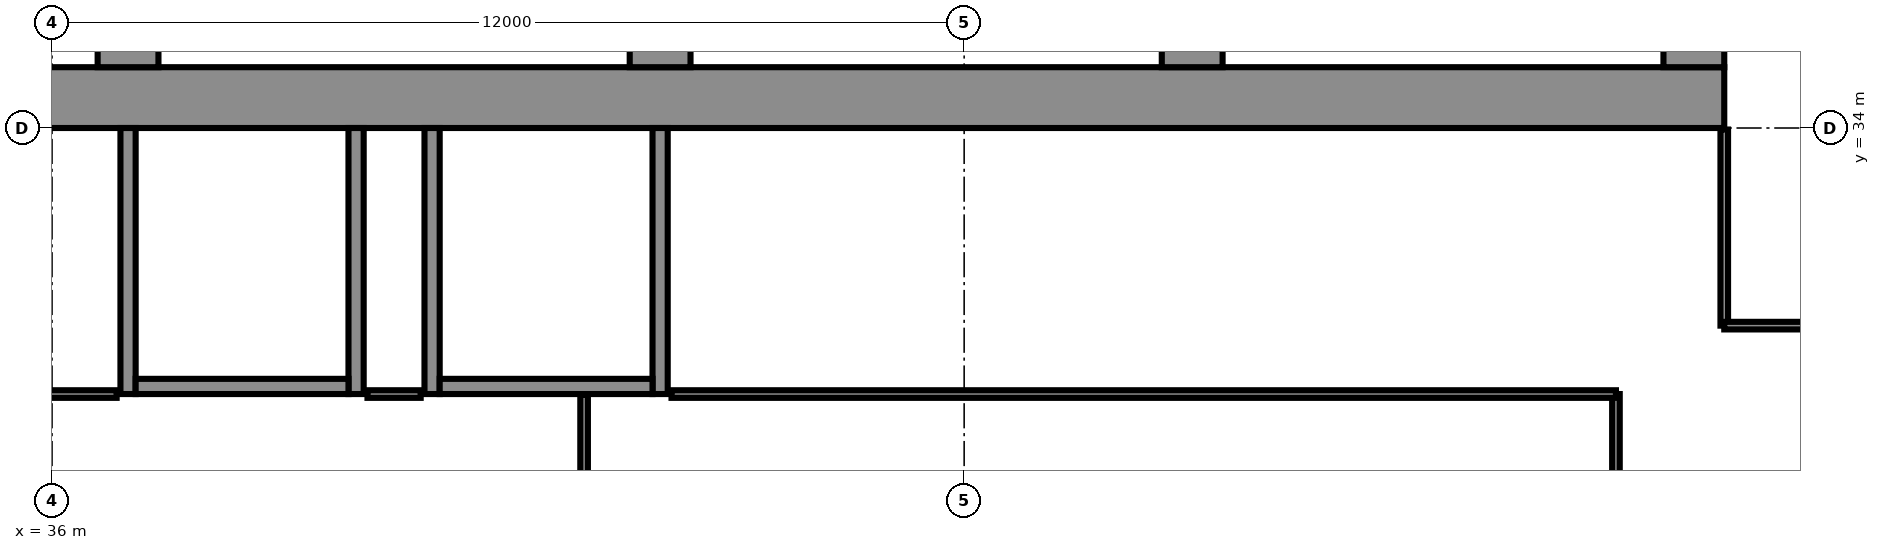
"""IFC4 building model, lengths in metres.
Left out: names, types, materials, properties, quantities, classifications, styles, units other than length and angle.
Written with IfcOpenShell. Run it as: python <this file> out.ifc"""

import sys

from ifc_helpers import new_model, si_unit, direction, frame, frame_2d, origin, place, context, subcontext, project, spatial, polyline, rectangle, outline, extrude, element, fill, save


model = new_model("IFC4")
c1 = context("Model", 3, precision=1e-05, world=origin(), true_north=direction((0.0, 1.0)))
c2 = subcontext(c1, "Body", "Model", "MODEL_VIEW")
j1 = project(units=[si_unit("LENGTHUNIT", "METRE"), si_unit("PLANEANGLEUNIT", "RADIAN")], contexts=[c1])
p1 = place(None, origin())
s1 = spatial("IfcSite", under=j1, at=p1, CompositionType="ELEMENT")
p2 = place(p1, origin())
s2 = spatial("IfcBuilding", under=s1, at=p2, CompositionType="ELEMENT")
p3 = place(p2, frame((0.0, 0.0, 151.9)))
s3 = spatial("IfcBuildingStorey", under=s2, at=p3, CompositionType="ELEMENT", Elevation=151.9)
p4 = place(p3, frame((16.0, 34.4, 0.0), z_axis=(0.0, 0.0, 1.0), x_axis=(1.0, 0.0, 0.0)))
e1 = element("IfcWall", 1, at=p4, inside=s3, PredefinedType="SHEAR", context=c2, shape_type="SweptSolid", body=[
    extrude(rectangle(XDim=42.0, YDim=0.8, at=frame_2d((21.0, 0.0))), origin(), (0.0, 0.0, 1.0), 3.6),
])
p5 = place(p4, frame((3.2, 0.0, 0.0)))
e2 = element("IfcOpeningElement", 2, at=p5, cuts=e1, PredefinedType="OPENING", context=c2, shape_type="SweptSolid", body=[
    extrude(rectangle(XDim=1.0, YDim=2.1, at=frame_2d((0.5, 1.05))), frame((0.0, 0.41, 0.0), z_axis=(0.0, -1.0, 0.0), x_axis=(1.0, 0.0, 0.0)), (0.0, 0.0, 1.0), 0.82),
])
p6 = place(p4, frame((7.65, 0.0, 0.0)))
e3 = element("IfcOpeningElement", 3, at=p6, cuts=e1, PredefinedType="OPENING", context=c2, shape_type="SweptSolid", body=[
    extrude(rectangle(XDim=1.2, YDim=2.1, at=frame_2d((0.6, 1.05))), frame((0.0, 0.41, 0.0), z_axis=(0.0, -1.0, 0.0), x_axis=(1.0, 0.0, 0.0)), (0.0, 0.0, 1.0), 0.82),
])
p7 = place(p4, frame((14.767, 0.0, 0.0)))
e4 = element("IfcOpeningElement", 4, at=p7, cuts=e1, PredefinedType="OPENING", context=c2, shape_type="SweptSolid", body=[
    extrude(rectangle(XDim=1.1, YDim=2.1, at=frame_2d((0.55, 1.05))), frame((0.0, 0.41, 0.0), z_axis=(0.0, -1.0, 0.0), x_axis=(1.0, 0.0, 0.0)), (0.0, 0.0, 1.0), 0.82),
])
p8 = place(p4, frame((19.133, 0.0, 0.0)))
e5 = element("IfcOpeningElement", 5, at=p8, cuts=e1, PredefinedType="OPENING", context=c2, shape_type="SweptSolid", body=[
    extrude(rectangle(XDim=1.1, YDim=2.1, at=frame_2d((0.55, 1.05))), frame((0.0, 0.41, 0.0), z_axis=(0.0, -1.0, 0.0), x_axis=(1.0, 0.0, 0.0)), (0.0, 0.0, 1.0), 0.82),
])
p9 = place(p4, frame((16.8, 0.0, 0.0)))
e6 = element("IfcOpeningElement", 6, at=p9, cuts=e1, PredefinedType="OPENING", context=c2, shape_type="SweptSolid", body=[
    extrude(rectangle(XDim=1.4, YDim=2.1, at=frame_2d((0.7, 1.05))), frame((0.0, 0.41, 0.0), z_axis=(0.0, -1.0, 0.0), x_axis=(1.0, 0.0, 0.0)), (0.0, 0.0, 1.0), 0.82),
])
p10 = place(p4, frame((21.767, 0.0, 0.0)))
e7 = element("IfcOpeningElement", 7, at=p10, cuts=e1, PredefinedType="OPENING", context=c2, shape_type="SweptSolid", body=[
    extrude(rectangle(XDim=1.1, YDim=2.1, at=frame_2d((0.55, 1.05))), frame((0.0, 0.41, 0.0), z_axis=(0.0, -1.0, 0.0), x_axis=(1.0, 0.0, 0.0)), (0.0, 0.0, 1.0), 0.82),
])
p11 = place(p4, frame((23.95, 0.0, 0.0)))
e8 = element("IfcOpeningElement", 8, at=p11, cuts=e1, PredefinedType="OPENING", context=c2, shape_type="SweptSolid", body=[
    extrude(rectangle(XDim=1.1, YDim=2.1, at=frame_2d((0.55, 1.05))), frame((0.0, 0.41, 0.0), z_axis=(0.0, -1.0, 0.0), x_axis=(1.0, 0.0, 0.0)), (0.0, 0.0, 1.0), 0.82),
])
p12 = place(p4, frame((26.133, 0.0, 0.0)))
e9 = element("IfcOpeningElement", 9, at=p12, cuts=e1, PredefinedType="OPENING", context=c2, shape_type="SweptSolid", body=[
    extrude(rectangle(XDim=1.1, YDim=2.1, at=frame_2d((0.55, 1.05))), frame((0.0, 0.41, 0.0), z_axis=(0.0, -1.0, 0.0), x_axis=(1.0, 0.0, 0.0)), (0.0, 0.0, 1.0), 0.82),
])
p13 = place(p4, frame((33.15, 0.0, 0.0)))
e10 = element("IfcOpeningElement", 10, at=p13, cuts=e1, PredefinedType="OPENING", context=c2, shape_type="SweptSolid", body=[
    extrude(rectangle(XDim=1.2, YDim=2.1, at=frame_2d((0.6, 1.05))), frame((0.0, 0.41, 0.0), z_axis=(0.0, -1.0, 0.0), x_axis=(1.0, 0.0, 0.0)), (0.0, 0.0, 1.0), 0.82),
])
p14 = place(p4, frame((35.817, 0.0, 0.0)))
e11 = element("IfcOpeningElement", 11, at=p14, cuts=e1, PredefinedType="OPENING", context=c2, shape_type="SweptSolid", body=[
    extrude(rectangle(XDim=1.0, YDim=2.1, at=frame_2d((0.5, 1.05))), frame((0.0, 0.41, 0.0), z_axis=(0.0, -1.0, 0.0), x_axis=(1.0, 0.0, 0.0)), (0.0, 0.0, 1.0), 0.82),
])
p15 = place(p4, frame((39.95, 0.0, 0.0)))
e12 = element("IfcOpeningElement", 12, at=p15, cuts=e1, PredefinedType="OPENING", context=c2, shape_type="SweptSolid", body=[
    extrude(rectangle(XDim=1.0, YDim=2.1, at=frame_2d((0.5, 1.05))), frame((0.0, 0.41, 0.0), z_axis=(0.0, -1.0, 0.0), x_axis=(1.0, 0.0, 0.0)), (0.0, 0.0, 1.0), 0.82),
])
p16 = place(p4, frame((37.767, 0.0, 0.0)))
e13 = element("IfcOpeningElement", 13, at=p16, cuts=e1, PredefinedType="OPENING", context=c2, shape_type="SweptSolid", body=[
    extrude(rectangle(XDim=1.4, YDim=2.1, at=frame_2d((0.7, 1.05))), frame((0.0, 0.41, 0.0), z_axis=(0.0, -1.0, 0.0), x_axis=(1.0, 0.0, 0.0)), (0.0, 0.0, 1.0), 0.82),
])
p17 = place(p3, frame((37.0, 34.8, 0.0), z_axis=(0.0, 0.0, 1.0), x_axis=(0.0, 1.0, 0.0)))
e14 = element("IfcWall", 14, at=p17, inside=s3, PredefinedType="SHEAR", context=c2, shape_type="SweptSolid", body=[
    extrude(rectangle(XDim=14.987, YDim=0.8, at=frame_2d((7.493, 0.0))), origin(), (0.0, 0.0, 1.0), 3.6),
])
p18 = place(p17, frame((11.312, 0.0, 0.0)))
e15 = element("IfcOpeningElement", 15, at=p18, cuts=e14, PredefinedType="OPENING", context=c2, shape_type="SweptSolid", body=[
    extrude(rectangle(XDim=1.0, YDim=2.1, at=frame_2d((0.5, 1.05))), frame((0.0, 0.41, 0.0), z_axis=(0.0, -1.0, 0.0), x_axis=(1.0, 0.0, 0.0)), (0.0, 0.0, 1.0), 0.82),
])
p19 = place(p17, frame((3.6, 0.0, 0.0)))
e16 = element("IfcOpeningElement", 16, at=p19, cuts=e14, PredefinedType="OPENING", context=c2, shape_type="SweptSolid", body=[
    extrude(rectangle(XDim=1.1, YDim=2.1, at=frame_2d((0.55, 1.05))), frame((0.0, 0.41, 0.0), z_axis=(0.0, -1.0, 0.0), x_axis=(1.0, 0.0, 0.0)), (0.0, 0.0, 1.0), 0.82),
])
p20 = place(p3, frame((44.0, 34.8, 0.0), z_axis=(0.0, 0.0, 1.0), x_axis=(0.0, 1.0, 0.0)))
e17 = element("IfcWall", 17, at=p20, inside=s3, PredefinedType="SHEAR", context=c2, shape_type="SweptSolid", body=[
    extrude(rectangle(XDim=14.374, YDim=0.8, at=frame_2d((7.187, 0.0))), origin(), (0.0, 0.0, 1.0), 3.6),
])
p21 = place(p20, frame((11.312, 0.0, 0.0)))
e18 = element("IfcOpeningElement", 18, at=p21, cuts=e17, PredefinedType="OPENING", context=c2, shape_type="SweptSolid", body=[
    extrude(rectangle(XDim=1.0, YDim=2.1, at=frame_2d((0.5, 1.05))), frame((0.0, 0.41, 0.0), z_axis=(0.0, -1.0, 0.0), x_axis=(1.0, 0.0, 0.0)), (0.0, 0.0, 1.0), 0.82),
])
p22 = place(p20, frame((3.6, 0.0, 0.0)))
e19 = element("IfcOpeningElement", 19, at=p22, cuts=e17, PredefinedType="OPENING", context=c2, shape_type="SweptSolid", body=[
    extrude(rectangle(XDim=1.1, YDim=2.1, at=frame_2d((0.55, 1.05))), frame((0.0, 0.41, 0.0), z_axis=(0.0, -1.0, 0.0), x_axis=(1.0, 0.0, 0.0)), (0.0, 0.0, 1.0), 0.82),
])
p23 = place(p3, frame((51.0, 34.8, 0.0), z_axis=(0.0, 0.0, 1.0), x_axis=(0.0, 1.0, 0.0)))
e20 = element("IfcWall", 20, at=p23, inside=s3, PredefinedType="SHEAR", context=c2, shape_type="SweptSolid", body=[
    extrude(rectangle(XDim=13.762, YDim=0.8, at=frame_2d((6.881, 0.0))), origin(), (0.0, 0.0, 1.0), 3.6),
])
p24 = place(p23, frame((3.6, 0.0, 0.0)))
e21 = element("IfcOpeningElement", 21, at=p24, cuts=e20, PredefinedType="OPENING", context=c2, shape_type="SweptSolid", body=[
    extrude(rectangle(XDim=1.1, YDim=2.1, at=frame_2d((0.55, 1.05))), frame((0.0, 0.41, 0.0), z_axis=(0.0, -1.0, 0.0), x_axis=(1.0, 0.0, 0.0)), (0.0, 0.0, 1.0), 0.82),
])
p25 = place(p3, frame((57.6, 34.8, 0.0), z_axis=(0.0, 0.0, 1.0), x_axis=(0.0, 1.0, 0.0)))
e22 = element("IfcWall", 22, at=p25, inside=s3, PredefinedType="SHEAR", context=c2, shape_type="SweptSolid", body=[
    extrude(rectangle(XDim=13.184, YDim=0.8, at=frame_2d((6.592, 0.0))), origin(), (0.0, 0.0, 1.0), 3.6),
])
p26 = place(p3, origin())
e23 = element("IfcWall", 23, at=p26, inside=s3, PredefinedType="PARTITIONING", context=c2, shape_type="SweptSolid", body=[
    extrude(outline(polyline([(34.567, 37.85), (34.767, 37.85), (36.6, 37.85), (36.6, 37.65), (34.767, 37.65), (34.767, 34.8), (34.567, 34.8), (34.567, 37.85)])), origin(), (0.0, 0.0, 1.0), 3.2),
])
p27 = place(p3, origin())
e24 = element("IfcWall", 24, at=p27, inside=s3, PredefinedType="PARTITIONING", context=c2, shape_type="SweptSolid", body=[
    extrude(outline(polyline([(41.567, 37.1), (39.433, 37.1), (39.433, 34.8), (39.233, 34.8), (39.233, 37.65), (37.4, 37.65), (37.4, 37.85), (39.233, 37.85), (39.433, 37.85), (39.433, 37.3), (41.567, 37.3), (41.567, 37.55), (41.767, 37.55), (43.6, 37.55), (43.6, 37.35), (41.767, 37.35), (41.767, 34.8), (41.567, 34.8), (41.567, 37.1)])), origin(), (0.0, 0.0, 1.0), 3.2),
])
p28 = place(p3, origin())
e25 = element("IfcWall", 25, at=p28, inside=s3, PredefinedType="PARTITIONING", context=c2, shape_type="SweptSolid", body=[
    extrude(outline(polyline([(53.233, 34.8), (53.233, 37.3), (53.433, 37.3), (53.433, 34.8), (53.233, 34.8)])), origin(), (0.0, 0.0, 1.0), 3.2),
])
p29 = place(p3, origin())
e26 = element("IfcWall", 26, at=p29, inside=s3, PredefinedType="PARTITIONING", context=c2, shape_type="SweptSolid", body=[
    extrude(outline(polyline([(55.5, 34.8), (55.5, 37.3), (55.7, 37.3), (55.7, 34.8), (55.5, 34.8)])), origin(), (0.0, 0.0, 1.0), 3.2),
])
p30 = place(p3, frame((37.0, 30.5, 0.0), z_axis=(0.0, 0.0, 1.0), x_axis=(0.0, 1.0, 0.0)))
e27 = element("IfcWall", 27, at=p30, inside=s3, PredefinedType="PARTITIONING", context=c2, shape_type="SweptSolid", body=[
    extrude(rectangle(XDim=3.5, YDim=0.2, at=frame_2d((1.75, 0.0))), origin(), (0.0, 0.0, 1.0), 3.2),
])
p31 = place(p30, frame((1.2, 0.0, 0.0)))
e28 = element("IfcOpeningElement", 28, at=p31, cuts=e27, PredefinedType="OPENING", context=c2, shape_type="SweptSolid", body=[
    extrude(rectangle(XDim=1.1, YDim=2.1, at=frame_2d((0.55, 1.05))), frame((0.0, 0.11, 0.0), z_axis=(0.0, -1.0, 0.0), x_axis=(1.0, 0.0, 0.0)), (0.0, 0.0, 1.0), 0.22),
])
p32 = place(p3, frame((40.0, 30.5, 0.0), z_axis=(0.0, 0.0, 1.0), x_axis=(0.0, 1.0, 0.0)))
e29 = element("IfcWall", 29, at=p32, inside=s3, PredefinedType="PARTITIONING", context=c2, shape_type="SweptSolid", body=[
    extrude(rectangle(XDim=3.5, YDim=0.2, at=frame_2d((1.75, 0.0))), origin(), (0.0, 0.0, 1.0), 3.2),
])
p33 = place(p3, frame((37.1, 30.6, 0.0), z_axis=(0.0, 0.0, 1.0), x_axis=(1.0, 0.0, 0.0)))
e30 = element("IfcWall", 30, at=p33, inside=s3, PredefinedType="PARTITIONING", context=c2, shape_type="SweptSolid", body=[
    extrude(rectangle(XDim=2.8, YDim=0.2, at=frame_2d((1.4, 0.0))), origin(), (0.0, 0.0, 1.0), 3.2),
])
p34 = place(p3, frame((41.0, 30.5, 0.0), z_axis=(0.0, 0.0, 1.0), x_axis=(0.0, 1.0, 0.0)))
e31 = element("IfcWall", 31, at=p34, inside=s3, PredefinedType="PARTITIONING", context=c2, shape_type="SweptSolid", body=[
    extrude(rectangle(XDim=3.5, YDim=0.2, at=frame_2d((1.75, 0.0))), origin(), (0.0, 0.0, 1.0), 3.2),
])
p35 = place(p3, frame((44.0, 30.5, 0.0), z_axis=(0.0, 0.0, 1.0), x_axis=(0.0, 1.0, 0.0)))
e32 = element("IfcWall", 32, at=p35, inside=s3, PredefinedType="PARTITIONING", context=c2, shape_type="SweptSolid", body=[
    extrude(rectangle(XDim=3.5, YDim=0.2, at=frame_2d((1.75, 0.0))), origin(), (0.0, 0.0, 1.0), 3.2),
])
p36 = place(p35, frame((1.2, 0.0, 0.0)))
e33 = element("IfcOpeningElement", 33, at=p36, cuts=e32, PredefinedType="OPENING", context=c2, shape_type="SweptSolid", body=[
    extrude(rectangle(XDim=1.1, YDim=2.1, at=frame_2d((0.55, 1.05))), frame((0.0, 0.11, 0.0), z_axis=(0.0, -1.0, 0.0), x_axis=(1.0, 0.0, 0.0)), (0.0, 0.0, 1.0), 0.22),
])
p37 = place(p3, frame((41.1, 30.6, 0.0), z_axis=(0.0, 0.0, 1.0), x_axis=(1.0, 0.0, 0.0)))
e34 = element("IfcWall", 34, at=p37, inside=s3, PredefinedType="PARTITIONING", context=c2, shape_type="SweptSolid", body=[
    extrude(rectangle(XDim=2.8, YDim=0.2, at=frame_2d((1.4, 0.0))), origin(), (0.0, 0.0, 1.0), 3.2),
])
p38 = place(p3, frame((17.8, 30.5, 0.0), z_axis=(0.0, 0.0, 1.0), x_axis=(1.0, 0.0, 0.0)))
e35 = element("IfcWall", 35, at=p38, inside=s3, PredefinedType="PARTITIONING", context=c2, shape_type="SweptSolid", body=[
    extrude(rectangle(XDim=19.05, YDim=0.1, at=frame_2d((9.525, 0.0))), origin(), (0.0, 0.0, 1.0), 3.2),
])
p39 = place(p38, frame((0.545, 0.0, 0.0)))
e36 = element("IfcOpeningElement", 36, at=p39, cuts=e35, PredefinedType="OPENING", context=c2, shape_type="SweptSolid", body=[
    extrude(rectangle(XDim=1.0, YDim=2.1, at=frame_2d((0.5, 1.05))), frame((0.0, 0.06, 0.0), z_axis=(0.0, -1.0, 0.0), x_axis=(1.0, 0.0, 0.0)), (0.0, 0.0, 1.0), 0.12),
])
p40 = place(p38, frame((12.62, 0.0, 0.0)))
e37 = element("IfcOpeningElement", 37, at=p40, cuts=e35, PredefinedType="OPENING", context=c2, shape_type="SweptSolid", body=[
    extrude(rectangle(XDim=1.0, YDim=2.1, at=frame_2d((0.5, 1.05))), frame((0.0, 0.06, 0.0), z_axis=(0.0, -1.0, 0.0), x_axis=(1.0, 0.0, 0.0)), (0.0, 0.0, 1.0), 0.12),
])
p41 = place(p3, frame((43.0, 15.27, 0.0), z_axis=(0.0, 0.0, 1.0), x_axis=(0.0, 1.0, 0.0)))
e38 = element("IfcWall", 38, at=p41, inside=s3, PredefinedType="PARTITIONING", context=c2, shape_type="SweptSolid", body=[
    extrude(rectangle(XDim=15.22, YDim=0.1, at=frame_2d((7.61, 0.0))), origin(), (0.0, 0.0, 1.0), 3.2),
])
p42 = place(p3, frame((56.575, 29.075, 0.0), z_axis=(0.0, 0.0, 1.0), x_axis=(0.0, 1.0, 0.0)))
e39 = element("IfcWall", 39, at=p42, inside=s3, PredefinedType="PARTITIONING", context=c2, shape_type="SweptSolid", body=[
    extrude(rectangle(XDim=1.425, YDim=0.1, at=frame_2d((0.712, 0.0))), origin(), (0.0, 0.0, 1.0), 3.2),
])
p43 = place(p3, frame((58.0, 31.4, 0.0), z_axis=(0.0, 0.0, 1.0), x_axis=(0.0, 1.0, 0.0)))
e40 = element("IfcWall", 40, at=p43, inside=s3, PredefinedType="PARTITIONING", context=c2, shape_type="SweptSolid", body=[
    extrude(rectangle(XDim=2.58, YDim=0.1, at=frame_2d((1.29, 0.0))), origin(), (0.0, 0.0, 1.0), 3.2),
])
p44 = place(p43, frame((0.9, 0.0, 0.0)))
e41 = element("IfcOpeningElement", 41, at=p44, cuts=e40, PredefinedType="OPENING", context=c2, shape_type="SweptSolid", body=[
    extrude(rectangle(XDim=1.0, YDim=2.1, at=frame_2d((0.5, 1.05))), frame((0.0, 0.06, 0.0), z_axis=(0.0, -1.0, 0.0), x_axis=(1.0, 0.0, 0.0)), (0.0, 0.0, 1.0), 0.12),
])
p45 = place(p3, frame((58.0, 31.4, 0.0), z_axis=(0.0, 0.0, 1.0), x_axis=(1.0, 0.0, 0.0)))
e42 = element("IfcWall", 42, at=p45, inside=s3, PredefinedType="PARTITIONING", context=c2, shape_type="SweptSolid", body=[
    extrude(rectangle(XDim=5.905, YDim=0.1, at=frame_2d((2.953, 0.0))), origin(), (0.0, 0.0, 1.0), 3.2),
])
p46 = place(p3, frame((40.15, 30.5, 0.0), z_axis=(0.0, 0.0, 1.0), x_axis=(1.0, 0.0, 0.0)))
e43 = element("IfcWall", 43, at=p46, inside=s3, PredefinedType="PARTITIONING", context=c2, shape_type="SweptSolid", body=[
    extrude(rectangle(XDim=0.7, YDim=0.1, at=frame_2d((0.35, 0.0))), origin(), (0.0, 0.0, 1.0), 3.2),
])
p47 = place(p3, frame((44.15, 30.5, 0.0), z_axis=(0.0, 0.0, 1.0), x_axis=(1.0, 0.0, 0.0)))
e44 = element("IfcWall", 44, at=p47, inside=s3, PredefinedType="PARTITIONING", context=c2, shape_type="SweptSolid", body=[
    extrude(rectangle(XDim=12.425, YDim=0.1, at=frame_2d((6.212, 0.0))), origin(), (0.0, 0.0, 1.0), 3.2),
])
p48 = place(p47, frame((11.15, 0.0, 0.0)))
e45 = element("IfcOpeningElement", 45, at=p48, cuts=e44, PredefinedType="OPENING", context=c2, shape_type="SweptSolid", body=[
    extrude(rectangle(XDim=1.0, YDim=2.1, at=frame_2d((0.5, 1.05))), frame((0.0, 0.06, 0.0), z_axis=(0.0, -1.0, 0.0), x_axis=(1.0, 0.0, 0.0)), (0.0, 0.0, 1.0), 0.12),
])
p49 = place(p8, origin())
e46 = element("IfcDoor", 46, at=p49, inside=s3, OperationType="DOUBLE_DOOR_SLIDING", PredefinedType="DOOR", context=c2, shape_type="SweptSolid", body=[
    extrude(rectangle(XDim=1.1, YDim=2.1, at=frame_2d((0.55, 1.05))), frame((0.0, 0.025, 0.0), z_axis=(0.0, -1.0, 0.0), x_axis=(1.0, 0.0, 0.0)), (0.0, 0.0, 1.0), 0.05),
])
fill(e5, e46)
p50 = place(p10, origin())
e47 = element("IfcDoor", 47, at=p50, inside=s3, OperationType="DOUBLE_DOOR_SLIDING", PredefinedType="DOOR", context=c2, shape_type="SweptSolid", body=[
    extrude(rectangle(XDim=1.1, YDim=2.1, at=frame_2d((0.55, 1.05))), frame((0.0, 0.025, 0.0), z_axis=(0.0, -1.0, 0.0), x_axis=(1.0, 0.0, 0.0)), (0.0, 0.0, 1.0), 0.05),
])
fill(e7, e47)
p51 = place(p11, origin())
e48 = element("IfcDoor", 48, at=p51, inside=s3, OperationType="DOUBLE_DOOR_SLIDING", PredefinedType="DOOR", context=c2, shape_type="SweptSolid", body=[
    extrude(rectangle(XDim=1.1, YDim=2.1, at=frame_2d((0.55, 1.05))), frame((0.0, 0.025, 0.0), z_axis=(0.0, -1.0, 0.0), x_axis=(1.0, 0.0, 0.0)), (0.0, 0.0, 1.0), 0.05),
])
fill(e8, e48)
p52 = place(p12, origin())
e49 = element("IfcDoor", 49, at=p52, inside=s3, OperationType="DOUBLE_DOOR_SLIDING", PredefinedType="DOOR", context=c2, shape_type="SweptSolid", body=[
    extrude(rectangle(XDim=1.1, YDim=2.1, at=frame_2d((0.55, 1.05))), frame((0.0, 0.025, 0.0), z_axis=(0.0, -1.0, 0.0), x_axis=(1.0, 0.0, 0.0)), (0.0, 0.0, 1.0), 0.05),
])
fill(e9, e49)
p53 = place(p13, origin())
e50 = element("IfcDoor", 50, at=p53, inside=s3, OperationType="SINGLE_SWING_LEFT", PredefinedType="DOOR", context=c2, shape_type="SweptSolid", body=[
    extrude(rectangle(XDim=1.2, YDim=2.1, at=frame_2d((0.6, 1.05))), frame((0.0, 0.025, 0.0), z_axis=(0.0, -1.0, 0.0), x_axis=(1.0, 0.0, 0.0)), (0.0, 0.0, 1.0), 0.05),
])
fill(e10, e50)
p54 = place(p14, origin())
e51 = element("IfcDoor", 51, at=p54, inside=s3, OperationType="SINGLE_SWING_LEFT", PredefinedType="DOOR", context=c2, shape_type="SweptSolid", body=[
    extrude(rectangle(XDim=1.0, YDim=2.1, at=frame_2d((0.5, 1.05))), frame((0.0, 0.4, 0.0), z_axis=(0.0, -1.0, 0.0), x_axis=(1.0, 0.0, 0.0)), (0.0, 0.0, 1.0), 0.8),
])
fill(e11, e51)
p55 = place(p15, origin())
e52 = element("IfcDoor", 52, at=p55, inside=s3, OperationType="SINGLE_SWING_LEFT", PredefinedType="DOOR", context=c2, shape_type="SweptSolid", body=[
    extrude(rectangle(XDim=1.0, YDim=2.1, at=frame_2d((0.5, 1.05))), frame((0.0, 0.4, 0.0), z_axis=(0.0, -1.0, 0.0), x_axis=(1.0, 0.0, 0.0)), (0.0, 0.0, 1.0), 0.8),
])
fill(e12, e52)
p56 = place(p16, origin())
e53 = element("IfcDoor", 53, at=p56, inside=s3, OperationType="DOUBLE_DOOR_SINGLE_SWING", PredefinedType="DOOR", context=c2, shape_type="SweptSolid", body=[
    extrude(rectangle(XDim=1.4, YDim=2.1, at=frame_2d((0.7, 1.05))), frame((0.0, 0.025, 0.0), z_axis=(0.0, -1.0, 0.0), x_axis=(1.0, 0.0, 0.0)), (0.0, 0.0, 1.0), 0.05),
])
fill(e13, e53)
p57 = place(p31, origin())
e54 = element("IfcDoor", 54, at=p57, inside=s3, OperationType="SINGLE_SWING_LEFT", PredefinedType="DOOR", context=c2, shape_type="SweptSolid", body=[
    extrude(rectangle(XDim=1.1, YDim=2.1, at=frame_2d((0.55, 1.05))), frame((0.0, 0.025, 0.0), z_axis=(0.0, -1.0, 0.0), x_axis=(1.0, 0.0, 0.0)), (0.0, 0.0, 1.0), 0.05),
])
fill(e28, e54)
p58 = place(p36, origin())
e55 = element("IfcDoor", 55, at=p58, inside=s3, OperationType="SINGLE_SWING_LEFT", PredefinedType="DOOR", context=c2, shape_type="SweptSolid", body=[
    extrude(rectangle(XDim=1.1, YDim=2.1, at=frame_2d((0.55, 1.05))), frame((0.0, 0.025, 0.0), z_axis=(0.0, -1.0, 0.0), x_axis=(1.0, 0.0, 0.0)), (0.0, 0.0, 1.0), 0.05),
])
fill(e33, e55)
p59 = place(p48, origin())
e56 = element("IfcDoor", 56, at=p59, inside=s3, OperationType="SINGLE_SWING_RIGHT", PredefinedType="DOOR", context=c2, shape_type="SweptSolid", body=[
    extrude(rectangle(XDim=1.0, YDim=2.1, at=frame_2d((0.5, 1.05))), frame((0.0, 0.025, 0.0), z_axis=(0.0, -1.0, 0.0), x_axis=(1.0, 0.0, 0.0)), (0.0, 0.0, 1.0), 0.05),
])
fill(e45, e56)
p60 = place(p44, origin())
e57 = element("IfcDoor", 57, at=p60, inside=s3, OperationType="SINGLE_SWING_RIGHT", PredefinedType="DOOR", context=c2, shape_type="SweptSolid", body=[
    extrude(rectangle(XDim=1.0, YDim=2.1, at=frame_2d((0.5, 1.05))), frame((0.0, 0.025, 0.0), z_axis=(0.0, -1.0, 0.0), x_axis=(1.0, 0.0, 0.0)), (0.0, 0.0, 1.0), 0.05),
])
fill(e41, e57)
save(model, sys.argv[1])
